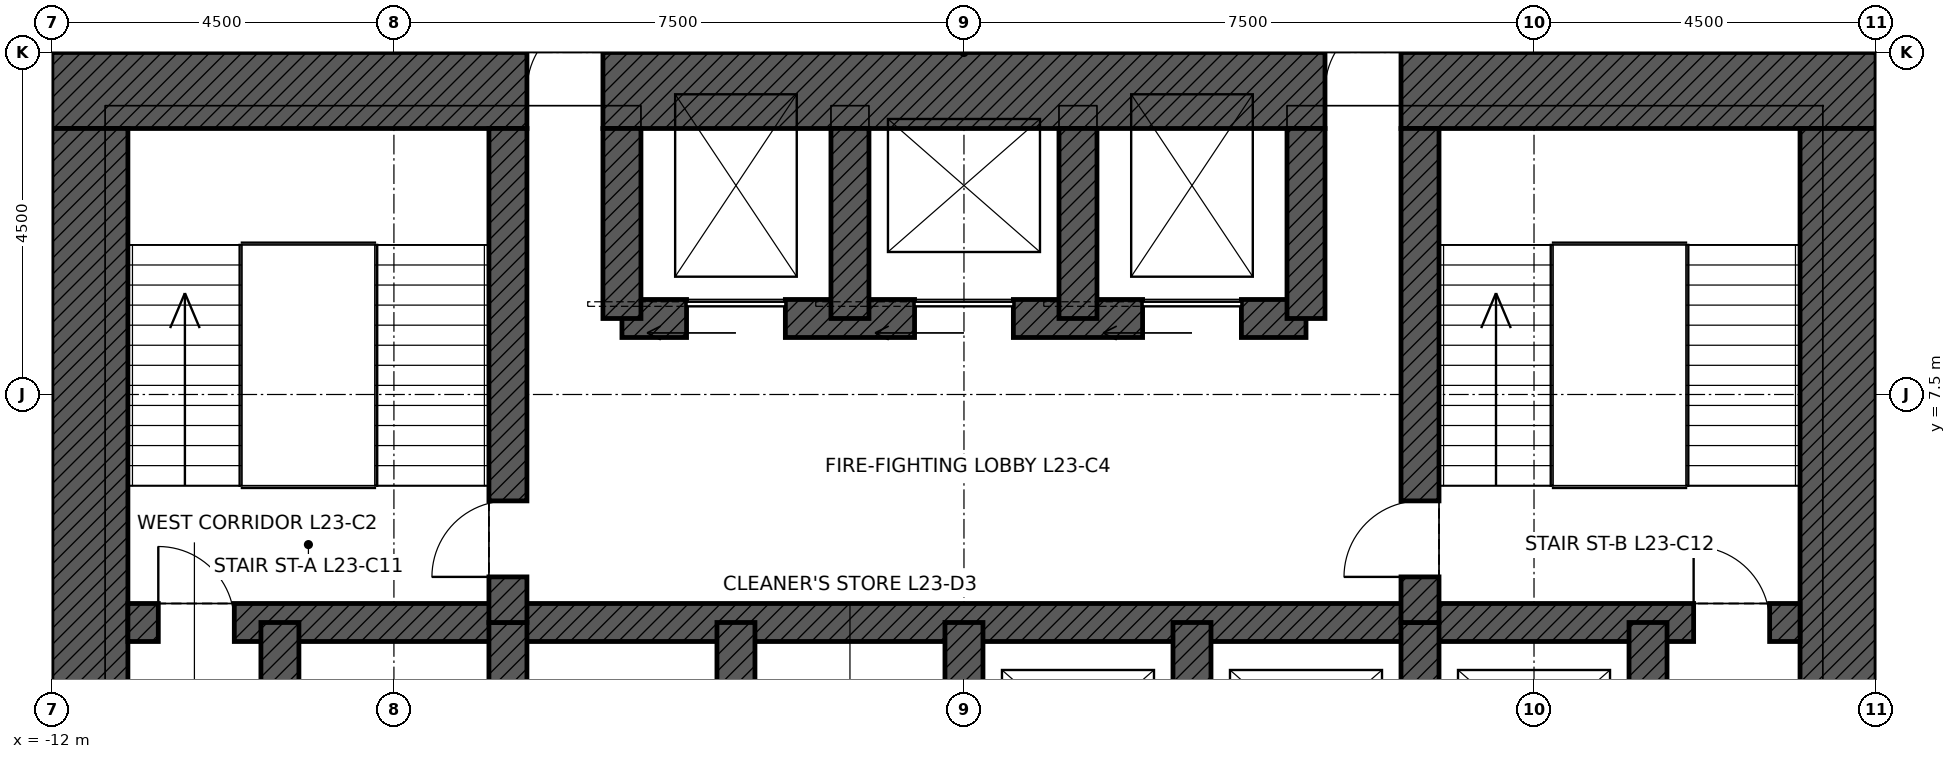
"""IFC4 building model, lengths in metres.
Left out: names, types, materials, properties, quantities, classifications, styles, units other than length and angle.
Written with IfcOpenShell. Run it as: python <this file> out.ifc"""

import sys

from ifc_helpers import new_model, si_unit, direction, frame, frame_2d, origin, place, context, subcontext, project, spatial, rectangle, extrude, element, fill, save


model = new_model("IFC4")
c1 = context("Model", 3, precision=1e-05, world=origin(), true_north=direction((0.0, 1.0)))
c2 = subcontext(c1, "Body", "Model", "MODEL_VIEW")
j1 = project(units=[si_unit("LENGTHUNIT", "METRE"), si_unit("PLANEANGLEUNIT", "RADIAN")], contexts=[c1])
p1 = place(None, origin())
s1 = spatial("IfcSite", under=j1, at=p1, CompositionType="ELEMENT")
p2 = place(p1, origin())
s2 = spatial("IfcBuilding", under=s1, at=p2, CompositionType="ELEMENT")
p3 = place(p2, frame((0.0, 0.0, 117.9)))
s3 = spatial("IfcBuildingStorey", under=s2, at=p3, CompositionType="ELEMENT", Elevation=117.9)
p4 = place(p3, frame((-12.0, 11.5, 0.0), z_axis=(0.0, 0.0, 1.0), x_axis=(1.0, 0.0, 0.0)))
e1 = element("IfcWall", 1, at=p4, inside=s3, PredefinedType="SHEAR", context=c2, shape_type="SweptSolid", body=[
    extrude(rectangle(XDim=24.0, YDim=1.0, at=frame_2d((12.0, 0.0))), origin(), (0.0, 0.0, 1.0), 4.5),
])
p5 = place(p4, frame((6.25, 0.0, 0.0)))
e2 = element("IfcOpeningElement", 2, at=p5, cuts=e1, PredefinedType="OPENING", context=c2, shape_type="SweptSolid", body=[
    extrude(rectangle(XDim=1.0, YDim=2.4, at=frame_2d((0.5, 1.2))), frame((0.0, 0.51, 0.0), z_axis=(0.0, -1.0, 0.0), x_axis=(1.0, 0.0, 0.0)), (0.0, 0.0, 1.0), 1.02),
])
p6 = place(p4, frame((16.75, 0.0, 0.0)))
e3 = element("IfcOpeningElement", 3, at=p6, cuts=e1, PredefinedType="OPENING", context=c2, shape_type="SweptSolid", body=[
    extrude(rectangle(XDim=1.0, YDim=2.4, at=frame_2d((0.5, 1.2))), frame((0.0, 0.51, 0.0), z_axis=(0.0, -1.0, 0.0), x_axis=(1.0, 0.0, 0.0)), (0.0, 0.0, 1.0), 1.02),
])
p7 = place(p3, frame((11.5, 11.0, 0.0), z_axis=(0.0, 0.0, 1.0), x_axis=(0.0, -1.0, 0.0)))
e4 = element("IfcWall", 4, at=p7, inside=s3, PredefinedType="SHEAR", context=c2, shape_type="SweptSolid", body=[
    extrude(rectangle(XDim=22.0, YDim=1.0, at=frame_2d((11.0, 0.0))), origin(), (0.0, 0.0, 1.0), 4.5),
])
p8 = place(p7, frame((10.5, 0.0, 0.0)))
e5 = element("IfcOpeningElement", 5, at=p8, cuts=e4, PredefinedType="OPENING", context=c2, shape_type="SweptSolid", body=[
    extrude(rectangle(XDim=1.0, YDim=2.4, at=frame_2d((0.5, 1.2))), frame((0.0, 0.51, 0.0), z_axis=(0.0, -1.0, 0.0), x_axis=(1.0, 0.0, 0.0)), (0.0, 0.0, 1.0), 1.02),
])
p9 = place(p3, frame((-11.5, -11.0, 0.0), z_axis=(0.0, 0.0, 1.0), x_axis=(0.0, 1.0, 0.0)))
e6 = element("IfcWall", 6, at=p9, inside=s3, PredefinedType="SHEAR", context=c2, shape_type="SweptSolid", body=[
    extrude(rectangle(XDim=22.0, YDim=1.0, at=frame_2d((11.0, 0.0))), origin(), (0.0, 0.0, 1.0), 4.5),
])
p10 = place(p9, frame((10.5, 0.0, 0.0)))
e7 = element("IfcOpeningElement", 7, at=p10, cuts=e6, PredefinedType="OPENING", context=c2, shape_type="SweptSolid", body=[
    extrude(rectangle(XDim=1.0, YDim=2.4, at=frame_2d((0.5, 1.2))), frame((0.0, 0.51, 0.0), z_axis=(0.0, -1.0, 0.0), x_axis=(1.0, 0.0, 0.0)), (0.0, 0.0, 1.0), 1.02),
])
p11 = place(p3, frame((-11.0, 4.5, 0.0), z_axis=(0.0, 0.0, 1.0), x_axis=(1.0, 0.0, 0.0)))
e8 = element("IfcWall", 8, at=p11, inside=s3, PredefinedType="SHEAR", context=c2, shape_type="SweptSolid", body=[
    extrude(rectangle(XDim=22.0, YDim=0.5, at=frame_2d((11.0, 0.0))), origin(), (0.0, 0.0, 1.0), 4.5),
])
p12 = place(p11, frame((0.4, 0.0, 0.0)))
e9 = element("IfcOpeningElement", 9, at=p12, cuts=e8, PredefinedType="OPENING", context=c2, shape_type="SweptSolid", body=[
    extrude(rectangle(XDim=1.0, YDim=2.1, at=frame_2d((0.5, 1.05))), frame((0.0, 0.26, 0.0), z_axis=(0.0, -1.0, 0.0), x_axis=(1.0, 0.0, 0.0)), (0.0, 0.0, 1.0), 0.52),
])
p13 = place(p11, frame((20.6, 0.0, 0.0)))
e10 = element("IfcOpeningElement", 10, at=p13, cuts=e8, PredefinedType="OPENING", context=c2, shape_type="SweptSolid", body=[
    extrude(rectangle(XDim=1.0, YDim=2.1, at=frame_2d((0.5, 1.05))), frame((0.0, 0.26, 0.0), z_axis=(0.0, -1.0, 0.0), x_axis=(1.0, 0.0, 0.0)), (0.0, 0.0, 1.0), 0.52),
])
p14 = place(p3, frame((-4.5, 8.5, 0.0), z_axis=(0.0, 0.0, 1.0), x_axis=(1.0, 0.0, 0.0)))
e11 = element("IfcWall", 11, at=p14, inside=s3, PredefinedType="SHEAR", context=c2, shape_type="SweptSolid", body=[
    extrude(rectangle(XDim=9.0, YDim=0.5, at=frame_2d((4.5, 0.0))), origin(), (0.0, 0.0, 1.0), 4.5),
])
p15 = place(p14, frame((0.85, 0.0, 0.0)))
e12 = element("IfcOpeningElement", 12, at=p15, cuts=e11, PredefinedType="OPENING", context=c2, shape_type="SweptSolid", body=[
    extrude(rectangle(XDim=1.3, YDim=2.4, at=frame_2d((0.65, 1.2))), frame((0.0, 0.26, 0.0), z_axis=(0.0, -1.0, 0.0), x_axis=(1.0, 0.0, 0.0)), (0.0, 0.0, 1.0), 0.52),
])
p16 = place(p14, frame((6.85, 0.0, 0.0)))
e13 = element("IfcOpeningElement", 13, at=p16, cuts=e11, PredefinedType="OPENING", context=c2, shape_type="SweptSolid", body=[
    extrude(rectangle(XDim=1.3, YDim=2.4, at=frame_2d((0.65, 1.2))), frame((0.0, 0.26, 0.0), z_axis=(0.0, -1.0, 0.0), x_axis=(1.0, 0.0, 0.0)), (0.0, 0.0, 1.0), 0.52),
])
p17 = place(p14, frame((3.85, 0.0, 0.0)))
e14 = element("IfcOpeningElement", 14, at=p17, cuts=e11, PredefinedType="OPENING", context=c2, shape_type="SweptSolid", body=[
    extrude(rectangle(XDim=1.3, YDim=2.4, at=frame_2d((0.65, 1.2))), frame((0.0, 0.26, 0.0), z_axis=(0.0, -1.0, 0.0), x_axis=(1.0, 0.0, 0.0)), (0.0, 0.0, 1.0), 0.52),
])
for number, where, z_axis, x_axis in (
    (15, (-9.0, 1.5, 0.0), (0.0, 0.0, 1.0), (0.0, 1.0, 0.0)),
    (16, (9.0, 1.5, 0.0), (0.0, 0.0, 1.0), (0.0, 1.0, 0.0)),
    (17, (-6.0, 1.5, 0.0), (0.0, 0.0, 1.0), (0.0, 1.0, 0.0)),
    (18, (-3.0, 1.5, 0.0), (0.0, 0.0, 1.0), (0.0, 1.0, 0.0)),
    (19, (0.0, 1.5, 0.0), (0.0, 0.0, 1.0), (0.0, 1.0, 0.0)),
    (20, (3.0, 1.5, 0.0), (0.0, 0.0, 1.0), (0.0, 1.0, 0.0)),
    (21, (6.0, 1.5, 0.0), (0.0, 0.0, 1.0), (0.0, 1.0, 0.0)),
):
    element("IfcWall", number, at=place(p3, frame(where, z_axis=z_axis, x_axis=x_axis)), inside=s3, PredefinedType="SHEAR", context=c2, shape_type="SweptSolid", body=[
        extrude(rectangle(XDim=3.0, YDim=0.5, at=frame_2d((1.5, 0.0))), origin(), (0.0, 0.0, 1.0), 4.5),
    ])
p18 = place(p3, frame((-6.0, 4.5, 0.0), z_axis=(0.0, 0.0, 1.0), x_axis=(0.0, 1.0, 0.0)))
e22 = element("IfcWall", 22, at=p18, inside=s3, PredefinedType="SHEAR", context=c2, shape_type="SweptSolid", body=[
    extrude(rectangle(XDim=6.5, YDim=0.5, at=frame_2d((3.25, 0.0))), origin(), (0.0, 0.0, 1.0), 4.5),
])
p19 = place(p18, frame((0.6, 0.0, 0.0)))
e23 = element("IfcOpeningElement", 23, at=p19, cuts=e22, PredefinedType="OPENING", context=c2, shape_type="SweptSolid", body=[
    extrude(rectangle(XDim=1.0, YDim=2.1, at=frame_2d((0.5, 1.05))), frame((0.0, 0.26, 0.0), z_axis=(0.0, -1.0, 0.0), x_axis=(1.0, 0.0, 0.0)), (0.0, 0.0, 1.0), 0.52),
])
p20 = place(p3, frame((6.0, 4.5, 0.0), z_axis=(0.0, 0.0, 1.0), x_axis=(0.0, 1.0, 0.0)))
e24 = element("IfcWall", 24, at=p20, inside=s3, PredefinedType="SHEAR", context=c2, shape_type="SweptSolid", body=[
    extrude(rectangle(XDim=6.5, YDim=0.5, at=frame_2d((3.25, 0.0))), origin(), (0.0, 0.0, 1.0), 4.5),
])
p21 = place(p20, frame((0.6, 0.0, 0.0)))
e25 = element("IfcOpeningElement", 25, at=p21, cuts=e24, PredefinedType="OPENING", context=c2, shape_type="SweptSolid", body=[
    extrude(rectangle(XDim=1.0, YDim=2.1, at=frame_2d((0.5, 1.05))), frame((0.0, 0.26, 0.0), z_axis=(0.0, -1.0, 0.0), x_axis=(1.0, 0.0, 0.0)), (0.0, 0.0, 1.0), 0.52),
])
for number, where, z_axis, x_axis in (
    (26, (-4.5, 8.5, 0.0), (0.0, 0.0, 1.0), (0.0, 1.0, 0.0)),
    (27, (4.5, 8.5, 0.0), (0.0, 0.0, 1.0), (0.0, 1.0, 0.0)),
    (28, (-1.5, 8.5, 0.0), (0.0, 0.0, 1.0), (0.0, 1.0, 0.0)),
    (29, (1.5, 8.5, 0.0), (0.0, 0.0, 1.0), (0.0, 1.0, 0.0)),
):
    element("IfcWall", number, at=place(p3, frame(where, z_axis=z_axis, x_axis=x_axis)), inside=s3, PredefinedType="SHEAR", context=c2, shape_type="SweptSolid", body=[
        extrude(rectangle(XDim=2.5, YDim=0.5, at=frame_2d((1.25, 0.0))), origin(), (0.0, 0.0, 1.0), 4.5),
    ])
p22 = place(p12, origin())
e30 = element("IfcDoor", 30, at=p22, inside=s3, OperationType="SINGLE_SWING_LEFT", PredefinedType="DOOR", context=c2, shape_type="SweptSolid", body=[
    extrude(rectangle(XDim=1.0, YDim=2.1, at=frame_2d((0.5, 1.05))), frame((0.0, 0.025, 0.0), z_axis=(0.0, -1.0, 0.0), x_axis=(1.0, 0.0, 0.0)), (0.0, 0.0, 1.0), 0.05),
])
fill(e9, e30)
p23 = place(p13, origin())
e31 = element("IfcDoor", 31, at=p23, inside=s3, OperationType="SINGLE_SWING_LEFT", PredefinedType="DOOR", context=c2, shape_type="SweptSolid", body=[
    extrude(rectangle(XDim=1.0, YDim=2.1, at=frame_2d((0.5, 1.05))), frame((0.0, 0.025, 0.0), z_axis=(0.0, -1.0, 0.0), x_axis=(1.0, 0.0, 0.0)), (0.0, 0.0, 1.0), 0.05),
])
fill(e10, e31)
p24 = place(p19, origin())
e32 = element("IfcDoor", 32, at=p24, inside=s3, OperationType="SINGLE_SWING_LEFT", PredefinedType="DOOR", context=c2, shape_type="SweptSolid", body=[
    extrude(rectangle(XDim=1.0, YDim=2.1, at=frame_2d((0.5, 1.05))), frame((0.0, 0.025, 0.0), z_axis=(0.0, -1.0, 0.0), x_axis=(1.0, 0.0, 0.0)), (0.0, 0.0, 1.0), 0.05),
])
fill(e23, e32)
p25 = place(p21, origin())
e33 = element("IfcDoor", 33, at=p25, inside=s3, OperationType="SINGLE_SWING_LEFT", PredefinedType="DOOR", context=c2, shape_type="SweptSolid", body=[
    extrude(rectangle(XDim=1.0, YDim=2.1, at=frame_2d((0.5, 1.05))), frame((0.0, 0.025, 0.0), z_axis=(0.0, -1.0, 0.0), x_axis=(1.0, 0.0, 0.0)), (0.0, 0.0, 1.0), 0.05),
])
fill(e25, e33)
p26 = place(p5, origin())
e34 = element("IfcDoor", 34, at=p26, inside=s3, OperationType="SINGLE_SWING_RIGHT", PredefinedType="DOOR", context=c2, shape_type="SweptSolid", body=[
    extrude(rectangle(XDim=1.0, YDim=2.4, at=frame_2d((0.5, 1.2))), frame((0.0, 0.485, 0.0), z_axis=(0.0, -1.0, 0.0), x_axis=(1.0, 0.0, 0.0)), (0.0, 0.0, 1.0), 0.05),
])
fill(e2, e34)
p27 = place(p6, origin())
e35 = element("IfcDoor", 35, at=p27, inside=s3, OperationType="SINGLE_SWING_RIGHT", PredefinedType="DOOR", context=c2, shape_type="SweptSolid", body=[
    extrude(rectangle(XDim=1.0, YDim=2.4, at=frame_2d((0.5, 1.2))), frame((0.0, 0.485, 0.0), z_axis=(0.0, -1.0, 0.0), x_axis=(1.0, 0.0, 0.0)), (0.0, 0.0, 1.0), 0.05),
])
fill(e3, e35)
p28 = place(p15, origin())
e36 = element("IfcDoor", 36, at=p28, inside=s3, OperationType="SLIDING_TO_LEFT", PredefinedType="DOOR", context=c2, shape_type="SweptSolid", body=[
    extrude(rectangle(XDim=1.3, YDim=2.4, at=frame_2d((0.65, 1.2))), frame((0.0, 0.025, 0.0), z_axis=(0.0, -1.0, 0.0), x_axis=(1.0, 0.0, 0.0)), (0.0, 0.0, 1.0), 0.05),
])
fill(e12, e36)
p29 = place(p16, origin())
e37 = element("IfcDoor", 37, at=p29, inside=s3, OperationType="SLIDING_TO_LEFT", PredefinedType="DOOR", context=c2, shape_type="SweptSolid", body=[
    extrude(rectangle(XDim=1.3, YDim=2.4, at=frame_2d((0.65, 1.2))), frame((0.0, 0.025, 0.0), z_axis=(0.0, -1.0, 0.0), x_axis=(1.0, 0.0, 0.0)), (0.0, 0.0, 1.0), 0.05),
])
fill(e13, e37)
p30 = place(p17, origin())
e38 = element("IfcDoor", 38, at=p30, inside=s3, OperationType="SLIDING_TO_LEFT", PredefinedType="DOOR", context=c2, shape_type="SweptSolid", body=[
    extrude(rectangle(XDim=1.3, YDim=2.4, at=frame_2d((0.65, 1.2))), frame((0.0, 0.025, 0.0), z_axis=(0.0, -1.0, 0.0), x_axis=(1.0, 0.0, 0.0)), (0.0, 0.0, 1.0), 0.05),
])
fill(e14, e38)
save(model, sys.argv[1])
